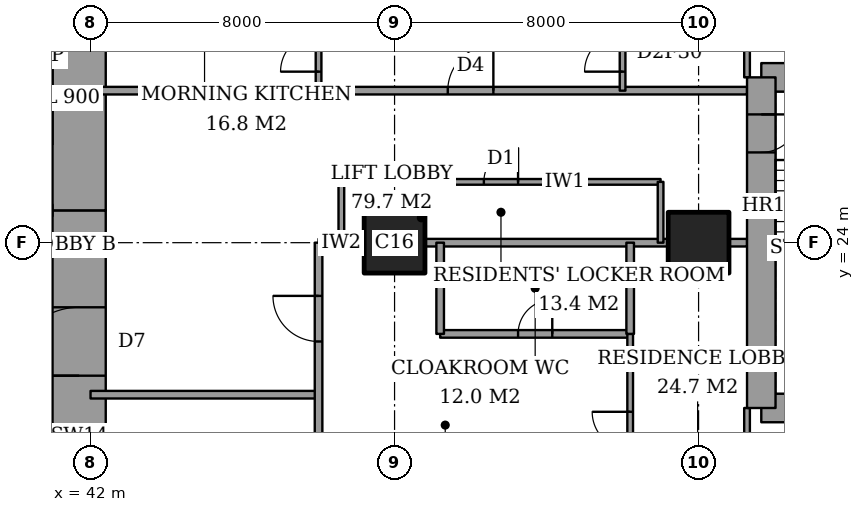
"""IFC4 building model, lengths in metres.
Left out: names, types, materials, properties, quantities, classifications, styles, units other than length and angle.
Written with IfcOpenShell. Run it as: python <this file> out.ifc"""

import sys

from ifc_helpers import new_model, si_unit, direction, frame, frame_2d, origin, origin_2d, place, context, subcontext, project, spatial, rectangle, extrude, element, fill, save


model = new_model("IFC4")
c1 = context("Model", 3, precision=1e-05, world=origin(), true_north=direction((0.0, 1.0)))
c2 = subcontext(c1, "Body", "Model", "MODEL_VIEW")
j1 = project(units=[si_unit("LENGTHUNIT", "METRE"), si_unit("PLANEANGLEUNIT", "RADIAN")], contexts=[c1])
p1 = place(None, origin())
s1 = spatial("IfcSite", under=j1, at=p1, CompositionType="ELEMENT")
p2 = place(p1, origin())
s2 = spatial("IfcBuilding", under=s1, at=p2, CompositionType="ELEMENT")
p3 = place(p2, frame((0.0, 0.0, 262.8)))
s3 = spatial("IfcBuildingStorey", under=s2, at=p3, CompositionType="ELEMENT", Elevation=262.8)
for number, where, z_axis, x_axis in (
    (1, (50.0, 24.0, 0.0), (0.0, 0.0, 1.0), (1.0, 0.0, 0.0)),
    (2, (58.0, 24.0, 0.0), (0.0, 0.0, 1.0), (1.0, 0.0, 0.0)),
):
    element("IfcColumn", number, at=place(p3, frame(where, z_axis=z_axis, x_axis=x_axis)), inside=s3, PredefinedType="COLUMN", context=c2, shape_type="SweptSolid", body=[
        extrude(rectangle(XDim=1.6, YDim=1.6, at=origin_2d()), origin(), (0.0, 0.0, 1.0), 3.6),
    ])
p4 = place(p3, frame((41.7, 13.0, 0.0), z_axis=(0.0, 0.0, 1.0), x_axis=(0.0, 1.0, 0.0)))
e3 = element("IfcWall", 3, at=p4, inside=s3, PredefinedType="SHEAR", context=c2, shape_type="SweptSolid", body=[
    extrude(rectangle(XDim=11.85, YDim=1.4, at=frame_2d((5.925, 0.0))), origin(), (0.0, 0.0, 1.0), 3.6),
])
p5 = place(p4, frame((7.5, 0.0, 0.0)))
e4 = element("IfcOpeningElement", 4, at=p5, cuts=e3, PredefinedType="OPENING", context=c2, shape_type="SweptSolid", body=[
    extrude(rectangle(XDim=1.8, YDim=2.4, at=frame_2d((0.9, 1.2))), frame((0.0, 0.71, 0.0), z_axis=(0.0, -1.0, 0.0), x_axis=(1.0, 0.0, 0.0)), (0.0, 0.0, 1.0), 1.42),
])
p6 = place(p3, frame((41.7, 24.85, 0.0), z_axis=(0.0, 0.0, 1.0), x_axis=(0.0, 1.0, 0.0)))
e5 = element("IfcWall", 5, at=p6, inside=s3, PredefinedType="SHEAR", context=c2, shape_type="SweptSolid", body=[
    extrude(rectangle(XDim=10.15, YDim=1.4, at=frame_2d((5.075, 0.0))), origin(), (0.0, 0.0, 1.0), 3.6),
])
for number, where, z_axis, x_axis in (
    (6, (59.65, 19.65, 0.0), (0.0, 0.0, 1.0), (1.0, 0.0, 0.0)),
    (7, (64.1, 28.35, 0.0), (0.0, 0.0, 1.0), (-1.0, 0.0, 0.0)),
):
    element("IfcWall", number, at=place(p3, frame(where, z_axis=z_axis, x_axis=x_axis)), inside=s3, PredefinedType="SHEAR", context=c2, shape_type="SweptSolid", body=[
        extrude(rectangle(XDim=4.45, YDim=0.75, at=frame_2d((2.225, 0.0))), origin(), (0.0, 0.0, 1.0), 3.6),
    ])
p7 = place(p3, frame((59.65, 28.35, 0.0), z_axis=(0.0, 0.0, 1.0), x_axis=(0.0, -1.0, 0.0)))
e8 = element("IfcWall", 8, at=p7, inside=s3, PredefinedType="SHEAR", context=c2, shape_type="SweptSolid", body=[
    extrude(rectangle(XDim=8.7, YDim=0.75, at=frame_2d((4.35, 0.0))), origin(), (0.0, 0.0, 1.0), 3.6),
])
p8 = place(p7, frame((0.975, 0.0, 0.0)))
e9 = element("IfcOpeningElement", 9, at=p8, cuts=e8, PredefinedType="OPENING", context=c2, shape_type="SweptSolid", body=[
    extrude(rectangle(XDim=1.0, YDim=2.1, at=frame_2d((0.5, 1.05))), frame((0.0, 0.385, 0.0), z_axis=(0.0, -1.0, 0.0), x_axis=(1.0, 0.0, 0.0)), (0.0, 0.0, 1.0), 0.77),
])
p9 = place(p3, frame((42.0, 20.0, 0.0), z_axis=(0.0, 0.0, 1.0), x_axis=(1.0, 0.0, 0.0)))
e10 = element("IfcWall", 10, at=p9, inside=s3, PredefinedType="PARTITIONING", context=c2, shape_type="SweptSolid", body=[
    extrude(rectangle(XDim=6.0, YDim=0.2, at=frame_2d((3.0, 0.0))), origin(), (0.0, 0.0, 1.0), 3.35),
])
p10 = place(p3, frame((51.2, 21.6, 0.0), z_axis=(0.0, 0.0, 1.0), x_axis=(1.0, 0.0, 0.0)))
e11 = element("IfcWall", 11, at=p10, inside=s3, PredefinedType="PARTITIONING", context=c2, shape_type="SweptSolid", body=[
    extrude(rectangle(XDim=5.0, YDim=0.2, at=frame_2d((2.5, 0.0))), origin(), (0.0, 0.0, 1.0), 3.35),
])
p11 = place(p10, frame((2.05, 0.0, 0.0)))
e12 = element("IfcOpeningElement", 12, at=p11, cuts=e11, PredefinedType="OPENING", context=c2, shape_type="SweptSolid", body=[
    extrude(rectangle(XDim=0.9, YDim=2.1, at=frame_2d((0.45, 1.05))), frame((0.0, 0.11, 0.0), z_axis=(0.0, -1.0, 0.0), x_axis=(1.0, 0.0, 0.0)), (0.0, 0.0, 1.0), 0.22),
])
p12 = place(p3, frame((48.0, 24.0, 0.0), z_axis=(0.0, 0.0, 1.0), x_axis=(1.0, 0.0, 0.0)))
e13 = element("IfcWall", 13, at=p12, inside=s3, PredefinedType="PARTITIONING", context=c2, shape_type="SweptSolid", body=[
    extrude(rectangle(XDim=1.2, YDim=0.2, at=frame_2d((0.6, 0.0))), origin(), (0.0, 0.0, 1.0), 3.35),
])
p13 = place(p3, frame((50.8, 24.0, 0.0), z_axis=(0.0, 0.0, 1.0), x_axis=(1.0, 0.0, 0.0)))
e14 = element("IfcWall", 14, at=p13, inside=s3, PredefinedType="PARTITIONING", context=c2, shape_type="SweptSolid", body=[
    extrude(rectangle(XDim=6.4, YDim=0.2, at=frame_2d((3.2, 0.0))), origin(), (0.0, 0.0, 1.0), 3.35),
])
p14 = place(p3, frame((58.8, 24.0, 0.0), z_axis=(0.0, 0.0, 1.0), x_axis=(1.0, 0.0, 0.0)))
e15 = element("IfcWall", 15, at=p14, inside=s3, PredefinedType="PARTITIONING", context=c2, shape_type="SweptSolid", body=[
    extrude(rectangle(XDim=0.475, YDim=0.2, at=frame_2d((0.237, 0.0))), origin(), (0.0, 0.0, 1.0), 3.35),
])
p15 = place(p3, frame((48.6, 25.6, 0.0), z_axis=(0.0, 0.0, 1.0), x_axis=(1.0, 0.0, 0.0)))
e16 = element("IfcWall", 16, at=p15, inside=s3, PredefinedType="PARTITIONING", context=c2, shape_type="SweptSolid", body=[
    extrude(rectangle(XDim=8.4, YDim=0.15, at=frame_2d((4.2, 0.0))), origin(), (0.0, 0.0, 1.0), 3.35),
])
p16 = place(p15, frame((3.75, 0.0, 0.0)))
e17 = element("IfcOpeningElement", 17, at=p16, cuts=e16, PredefinedType="OPENING", context=c2, shape_type="SweptSolid", body=[
    extrude(rectangle(XDim=0.9, YDim=2.1, at=frame_2d((0.45, 1.05))), frame((0.0, 0.085, 0.0), z_axis=(0.0, -1.0, 0.0), x_axis=(1.0, 0.0, 0.0)), (0.0, 0.0, 1.0), 0.17),
])
p17 = place(p3, frame((42.0, 28.0, 0.0), z_axis=(0.0, 0.0, 1.0), x_axis=(1.0, 0.0, 0.0)))
e18 = element("IfcWall", 18, at=p17, inside=s3, PredefinedType="PARTITIONING", context=c2, shape_type="SweptSolid", body=[
    extrude(rectangle(XDim=17.275, YDim=0.2, at=frame_2d((8.637, 0.0))), origin(), (0.0, 0.0, 1.0), 3.35),
])
p18 = place(p17, frame((9.4, 0.0, 0.0)))
e19 = element("IfcOpeningElement", 19, at=p18, cuts=e18, PredefinedType="OPENING", context=c2, shape_type="SweptSolid", body=[
    extrude(rectangle(XDim=1.2, YDim=2.4, at=frame_2d((0.6, 1.2))), frame((0.0, 0.11, 0.0), z_axis=(0.0, -1.0, 0.0), x_axis=(1.0, 0.0, 0.0)), (0.0, 0.0, 1.0), 0.22),
])
p19 = place(p3, frame((48.0, 16.5, 0.0), z_axis=(0.0, 0.0, 1.0), x_axis=(0.0, 1.0, 0.0)))
e20 = element("IfcWall", 20, at=p19, inside=s3, PredefinedType="PARTITIONING", context=c2, shape_type="SweptSolid", body=[
    extrude(rectangle(XDim=7.5, YDim=0.2, at=frame_2d((3.75, 0.0))), origin(), (0.0, 0.0, 1.0), 3.35),
])
p20 = place(p19, frame((4.9, 0.0, 0.0)))
e21 = element("IfcOpeningElement", 21, at=p20, cuts=e20, PredefinedType="OPENING", context=c2, shape_type="SweptSolid", body=[
    extrude(rectangle(XDim=1.2, YDim=2.4, at=frame_2d((0.6, 1.2))), frame((0.0, 0.11, 0.0), z_axis=(0.0, -1.0, 0.0), x_axis=(1.0, 0.0, 0.0)), (0.0, 0.0, 1.0), 0.22),
])
p21 = place(p19, frame((1.3, 0.0, 0.0)))
e22 = element("IfcOpeningElement", 22, at=p21, cuts=e20, PredefinedType="OPENING", context=c2, shape_type="SweptSolid", body=[
    extrude(rectangle(XDim=0.9, YDim=2.1, at=frame_2d((0.45, 1.05))), frame((0.0, 0.11, 0.0), z_axis=(0.0, -1.0, 0.0), x_axis=(1.0, 0.0, 0.0)), (0.0, 0.0, 1.0), 0.22),
])
p22 = place(p3, frame((48.0, 28.0, 0.0), z_axis=(0.0, 0.0, 1.0), x_axis=(0.0, 1.0, 0.0)))
e23 = element("IfcWall", 23, at=p22, inside=s3, PredefinedType="PARTITIONING", context=c2, shape_type="SweptSolid", body=[
    extrude(rectangle(XDim=9.2, YDim=0.15, at=frame_2d((4.6, 0.0))), origin(), (0.0, 0.0, 1.0), 3.35),
])
p23 = place(p22, frame((0.5, 0.0, 0.0)))
e24 = element("IfcOpeningElement", 24, at=p23, cuts=e23, PredefinedType="OPENING", context=c2, shape_type="SweptSolid", body=[
    extrude(rectangle(XDim=1.0, YDim=2.1, at=frame_2d((0.5, 1.05))), frame((0.0, 0.085, 0.0), z_axis=(0.0, -1.0, 0.0), x_axis=(1.0, 0.0, 0.0)), (0.0, 0.0, 1.0), 0.17),
])
p24 = place(p3, frame((48.6, 24.0, 0.0), z_axis=(0.0, 0.0, 1.0), x_axis=(0.0, 1.0, 0.0)))
e25 = element("IfcWall", 25, at=p24, inside=s3, PredefinedType="PARTITIONING", context=c2, shape_type="SweptSolid", body=[
    extrude(rectangle(XDim=1.6, YDim=0.15, at=frame_2d((0.8, 0.0))), origin(), (0.0, 0.0, 1.0), 3.35),
])
p25 = place(p3, frame((51.2, 21.6, 0.0), z_axis=(0.0, 0.0, 1.0), x_axis=(0.0, 1.0, 0.0)))
e26 = element("IfcWall", 26, at=p25, inside=s3, PredefinedType="PARTITIONING", context=c2, shape_type="SweptSolid", body=[
    extrude(rectangle(XDim=2.4, YDim=0.2, at=frame_2d((1.2, 0.0))), origin(), (0.0, 0.0, 1.0), 3.35),
])
p26 = place(p3, frame((56.0, 28.0, 0.0), z_axis=(0.0, 0.0, 1.0), x_axis=(0.0, 1.0, 0.0)))
e27 = element("IfcWall", 27, at=p26, inside=s3, PredefinedType="PARTITIONING", context=c2, shape_type="SweptSolid", body=[
    extrude(rectangle(XDim=9.2, YDim=0.15, at=frame_2d((4.6, 0.0))), origin(), (0.0, 0.0, 1.0), 3.35),
])
p27 = place(p26, frame((0.5, 0.0, 0.0)))
e28 = element("IfcOpeningElement", 28, at=p27, cuts=e27, PredefinedType="OPENING", context=c2, shape_type="SweptSolid", body=[
    extrude(rectangle(XDim=1.0, YDim=2.1, at=frame_2d((0.5, 1.05))), frame((0.0, 0.085, 0.0), z_axis=(0.0, -1.0, 0.0), x_axis=(1.0, 0.0, 0.0)), (0.0, 0.0, 1.0), 0.17),
])
p28 = place(p3, frame((56.2, 21.6, 0.0), z_axis=(0.0, 0.0, 1.0), x_axis=(0.0, 1.0, 0.0)))
e29 = element("IfcWall", 29, at=p28, inside=s3, PredefinedType="PARTITIONING", context=c2, shape_type="SweptSolid", body=[
    extrude(rectangle(XDim=2.4, YDim=0.2, at=frame_2d((1.2, 0.0))), origin(), (0.0, 0.0, 1.0), 3.35),
])
p29 = place(p3, frame((56.2, 13.8, 0.0), z_axis=(0.0, 0.0, 1.0), x_axis=(0.0, 1.0, 0.0)))
e30 = element("IfcWall", 30, at=p29, inside=s3, PredefinedType="PARTITIONING", context=c2, shape_type="SweptSolid", body=[
    extrude(rectangle(XDim=7.8, YDim=0.15, at=frame_2d((3.9, 0.0))), origin(), (0.0, 0.0, 1.0), 3.35),
])
p30 = place(p29, frame((4.75, 0.0, 0.0)))
e31 = element("IfcOpeningElement", 31, at=p30, cuts=e30, PredefinedType="OPENING", context=c2, shape_type="SweptSolid", body=[
    extrude(rectangle(XDim=1.0, YDim=2.1, at=frame_2d((0.5, 1.05))), frame((0.0, 0.085, 0.0), z_axis=(0.0, -1.0, 0.0), x_axis=(1.0, 0.0, 0.0)), (0.0, 0.0, 1.0), 0.17),
])
p31 = place(p3, frame((57.0, 24.0, 0.0), z_axis=(0.0, 0.0, 1.0), x_axis=(0.0, 1.0, 0.0)))
e32 = element("IfcWall", 32, at=p31, inside=s3, PredefinedType="PARTITIONING", context=c2, shape_type="SweptSolid", body=[
    extrude(rectangle(XDim=1.6, YDim=0.15, at=frame_2d((0.8, 0.0))), origin(), (0.0, 0.0, 1.0), 3.35),
])
p32 = place(p3, frame((59.275, 17.2, 0.0), z_axis=(0.0, 0.0, 1.0), x_axis=(0.0, 1.0, 0.0)))
e33 = element("IfcWall", 33, at=p32, inside=s3, PredefinedType="PARTITIONING", context=c2, shape_type="SweptSolid", body=[
    extrude(rectangle(XDim=2.45, YDim=0.15, at=frame_2d((1.225, 0.0))), origin(), (0.0, 0.0, 1.0), 3.35),
])
p33 = place(p32, frame((0.538, 0.0, 0.0)))
e34 = element("IfcOpeningElement", 34, at=p33, cuts=e33, PredefinedType="OPENING", context=c2, shape_type="SweptSolid", body=[
    extrude(rectangle(XDim=1.0, YDim=2.1, at=frame_2d((0.5, 1.05))), frame((0.0, 0.085, 0.0), z_axis=(0.0, -1.0, 0.0), x_axis=(1.0, 0.0, 0.0)), (0.0, 0.0, 1.0), 0.17),
])
p34 = place(p3, frame((59.275, 28.35, 0.0), z_axis=(0.0, 0.0, 1.0), x_axis=(0.0, 1.0, 0.0)))
e35 = element("IfcWall", 35, at=p34, inside=s3, PredefinedType="PARTITIONING", context=c2, shape_type="SweptSolid", body=[
    extrude(rectangle(XDim=2.45, YDim=0.15, at=frame_2d((1.225, 0.0))), origin(), (0.0, 0.0, 1.0), 3.35),
])
p35 = place(p34, frame((0.913, 0.0, 0.0)))
e36 = element("IfcOpeningElement", 36, at=p35, cuts=e35, PredefinedType="OPENING", context=c2, shape_type="SweptSolid", body=[
    extrude(rectangle(XDim=1.0, YDim=2.1, at=frame_2d((0.5, 1.05))), frame((0.0, 0.085, 0.0), z_axis=(0.0, -1.0, 0.0), x_axis=(1.0, 0.0, 0.0)), (0.0, 0.0, 1.0), 0.17),
])
p36 = place(p30, origin())
e37 = element("IfcDoor", 37, at=p36, inside=s3, OperationType="SINGLE_SWING_LEFT", PredefinedType="DOOR", context=c2, shape_type="SweptSolid", body=[
    extrude(rectangle(XDim=1.0, YDim=2.1, at=frame_2d((0.5, 1.05))), frame((0.0, 0.025, 0.0), z_axis=(0.0, -1.0, 0.0), x_axis=(1.0, 0.0, 0.0)), (0.0, 0.0, 1.0), 0.05),
])
fill(e31, e37)
p37 = place(p11, origin())
e38 = element("IfcDoor", 38, at=p37, inside=s3, OperationType="SINGLE_SWING_LEFT", PredefinedType="DOOR", context=c2, shape_type="SweptSolid", body=[
    extrude(rectangle(XDim=0.9, YDim=2.1, at=frame_2d((0.45, 1.05))), frame((0.0, 0.025, 0.0), z_axis=(0.0, -1.0, 0.0), x_axis=(1.0, 0.0, 0.0)), (0.0, 0.0, 1.0), 0.05),
])
fill(e12, e38)
p38 = place(p20, origin())
e39 = element("IfcDoor", 39, at=p38, inside=s3, OperationType="SINGLE_SWING_LEFT", PredefinedType="DOOR", context=c2, shape_type="SweptSolid", body=[
    extrude(rectangle(XDim=1.2, YDim=2.4, at=frame_2d((0.6, 1.2))), frame((0.0, 0.025, 0.0), z_axis=(0.0, -1.0, 0.0), x_axis=(1.0, 0.0, 0.0)), (0.0, 0.0, 1.0), 0.05),
])
fill(e21, e39)
p39 = place(p27, origin())
e40 = element("IfcDoor", 40, at=p39, inside=s3, OperationType="SINGLE_SWING_RIGHT", PredefinedType="DOOR", context=c2, shape_type="SweptSolid", body=[
    extrude(rectangle(XDim=1.0, YDim=2.1, at=frame_2d((0.5, 1.05))), frame((0.0, 0.025, 0.0), z_axis=(0.0, -1.0, 0.0), x_axis=(1.0, 0.0, 0.0)), (0.0, 0.0, 1.0), 0.05),
])
fill(e28, e40)
p40 = place(p18, origin())
e41 = element("IfcDoor", 41, at=p40, inside=s3, OperationType="SINGLE_SWING_LEFT", PredefinedType="DOOR", context=c2, shape_type="SweptSolid", body=[
    extrude(rectangle(XDim=1.2, YDim=2.4, at=frame_2d((0.6, 1.2))), frame((0.0, 0.025, 0.0), z_axis=(0.0, -1.0, 0.0), x_axis=(1.0, 0.0, 0.0)), (0.0, 0.0, 1.0), 0.05),
])
fill(e19, e41)
p41 = place(p23, origin())
e42 = element("IfcDoor", 42, at=p41, inside=s3, OperationType="SINGLE_SWING_RIGHT", PredefinedType="DOOR", context=c2, shape_type="SweptSolid", body=[
    extrude(rectangle(XDim=1.0, YDim=2.1, at=frame_2d((0.5, 1.05))), frame((0.0, 0.025, 0.0), z_axis=(0.0, -1.0, 0.0), x_axis=(1.0, 0.0, 0.0)), (0.0, 0.0, 1.0), 0.05),
])
fill(e24, e42)
p42 = place(p16, origin())
e43 = element("IfcDoor", 43, at=p42, inside=s3, OperationType="SINGLE_SWING_LEFT", PredefinedType="DOOR", context=c2, shape_type="SweptSolid", body=[
    extrude(rectangle(XDim=0.9, YDim=2.1, at=frame_2d((0.45, 1.05))), frame((0.0, 0.025, 0.0), z_axis=(0.0, -1.0, 0.0), x_axis=(1.0, 0.0, 0.0)), (0.0, 0.0, 1.0), 0.05),
])
fill(e17, e43)
p43 = place(p5, origin())
e44 = element("IfcDoor", 44, at=p43, inside=s3, OperationType="DOUBLE_DOOR_DOUBLE_SWING", PredefinedType="DOOR", context=c2, shape_type="SweptSolid", body=[
    extrude(rectangle(XDim=1.8, YDim=2.4, at=frame_2d((0.9, 1.2))), frame((0.0, 0.025, 0.0), z_axis=(0.0, -1.0, 0.0), x_axis=(1.0, 0.0, 0.0)), (0.0, 0.0, 1.0), 0.05),
])
fill(e4, e44)
p44 = place(p8, origin())
e45 = element("IfcDoor", 45, at=p44, inside=s3, OperationType="SINGLE_SWING_RIGHT", PredefinedType="DOOR", context=c2, shape_type="SweptSolid", body=[
    extrude(rectangle(XDim=1.0, YDim=2.1, at=frame_2d((0.5, 1.05))), frame((0.0, 0.025, 0.0), z_axis=(0.0, -1.0, 0.0), x_axis=(1.0, 0.0, 0.0)), (0.0, 0.0, 1.0), 0.05),
])
fill(e9, e45)
save(model, sys.argv[1])
